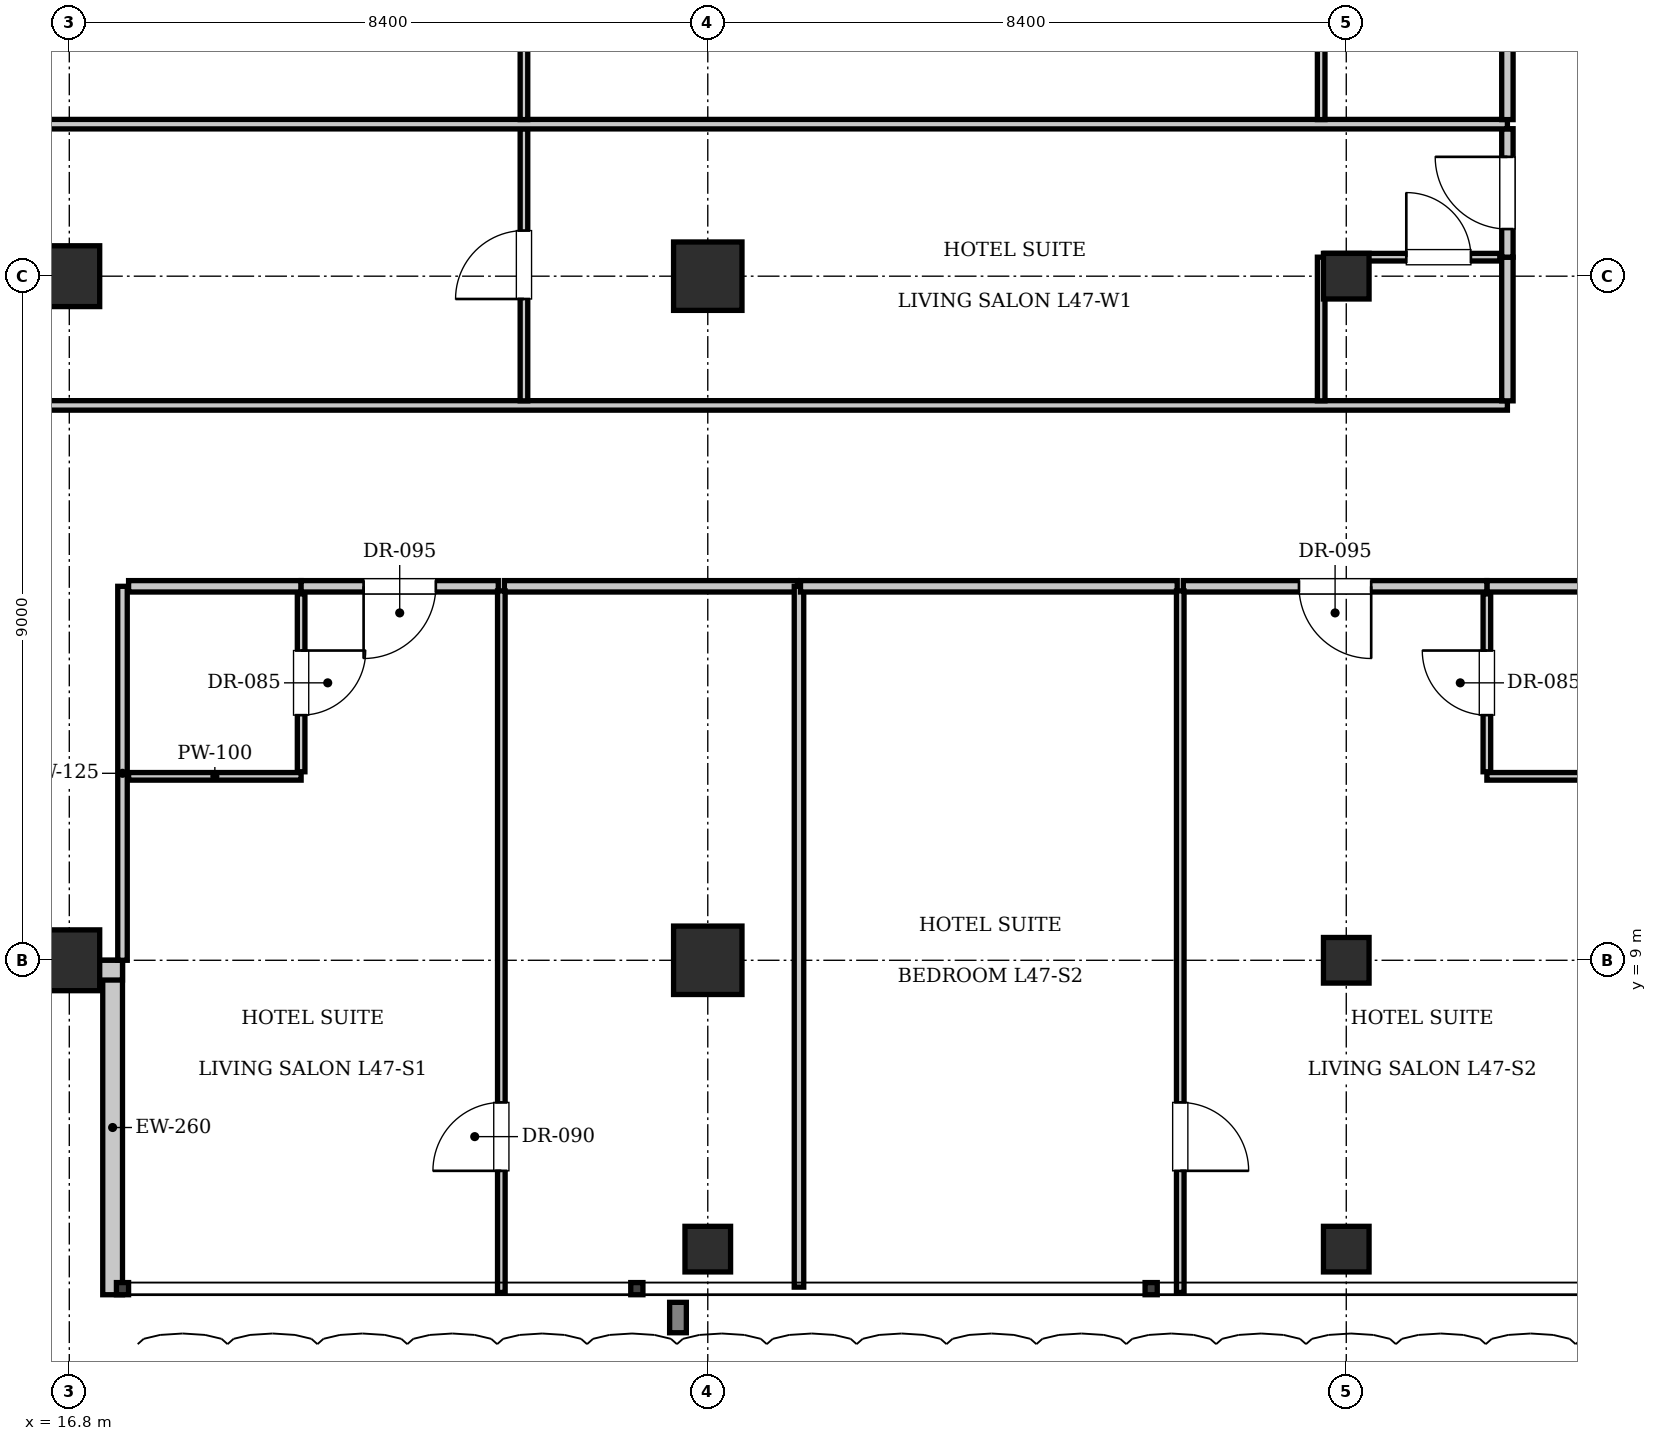
"""IFC4 building model, lengths in metres.
Left out: names, types, materials, properties, quantities, classifications, styles, units other than length and angle.
Written with IfcOpenShell. Run it as: python <this file> out.ifc"""

import sys

from ifc_helpers import new_model, si_unit, direction, frame, frame_2d, origin, origin_2d, place, context, subcontext, project, spatial, rectangle, i_section, extrude, element, fill, save


model = new_model("IFC4")
c1 = context("Model", 3, precision=1e-05, world=origin(), true_north=direction((0.0, 1.0)))
c2 = subcontext(c1, "Body", "Model", "MODEL_VIEW")
j1 = project(units=[si_unit("LENGTHUNIT", "METRE"), si_unit("PLANEANGLEUNIT", "RADIAN")], contexts=[c1])
p1 = place(None, origin())
s1 = spatial("IfcSite", under=j1, at=p1, CompositionType="ELEMENT")
p2 = place(p1, origin())
s2 = spatial("IfcBuilding", under=s1, at=p2, CompositionType="ELEMENT")
p3 = place(p2, frame((0.0, 0.0, 192.85)))
s3 = spatial("IfcBuildingStorey", under=s2, at=p3, CompositionType="ELEMENT", Elevation=192.85)
for number, where, z_axis, x_axis in (
    (1, (25.2, 18.0, 0.0), (0.0, 0.0, 1.0), (1.0, 0.0, 0.0)),
    (2, (25.2, 9.0, 0.0), (0.0, 0.0, 1.0), (1.0, 0.0, 0.0)),
):
    element("IfcColumn", number, at=place(p3, frame(where, z_axis=z_axis, x_axis=x_axis)), inside=s3, PredefinedType="COLUMN", context=c2, shape_type="SweptSolid", body=[
        extrude(rectangle(XDim=0.9, YDim=0.9, at=origin_2d()), origin(), (0.0, 0.0, 1.0), 3.85),
    ])
for number, where, z_axis, x_axis in (
    (3, (33.6, 9.0, 0.0), (0.0, 0.0, 1.0), (1.0, 0.0, 0.0)),
    (4, (33.6, 18.0, 0.0), (0.0, 0.0, 1.0), (1.0, 0.0, 0.0)),
):
    element("IfcColumn", number, at=place(p3, frame(where, z_axis=z_axis, x_axis=x_axis)), inside=s3, PredefinedType="COLUMN", context=c2, shape_type="SweptSolid", body=[
        extrude(i_section(OverallWidth=0.6, OverallDepth=0.6, WebThickness=0.025, FlangeThickness=0.038, at=origin_2d()), origin(), (0.0, 0.0, 1.0), 3.85),
    ])
for number, where, z_axis, x_axis in (
    (5, (16.8, 9.0, 0.0), (0.0, 0.0, 1.0), (1.0, 0.0, 0.0)),
    (6, (16.8, 18.0, 0.0), (0.0, 0.0, 1.0), (1.0, 0.0, 0.0)),
):
    element("IfcColumn", number, at=place(p3, frame(where, z_axis=z_axis, x_axis=x_axis)), inside=s3, PredefinedType="COLUMN", context=c2, shape_type="SweptSolid", body=[
        extrude(rectangle(XDim=0.8, YDim=0.8, at=origin_2d()), origin(), (0.0, 0.0, 1.0), 3.85),
    ])
for number, where, z_axis, x_axis in (
    (7, (25.2, 5.2, 0.0), (0.0, 0.0, 1.0), (1.0, 0.0, 0.0)),
    (8, (33.6, 5.2, 0.0), (0.0, 0.0, 1.0), (1.0, 0.0, 0.0)),
):
    element("IfcColumn", number, at=place(p3, frame(where, z_axis=z_axis, x_axis=x_axis)), inside=s3, PredefinedType="COLUMN", context=c2, shape_type="SweptSolid", body=[
        extrude(i_section(OverallWidth=0.6, OverallDepth=0.6, WebThickness=0.025, FlangeThickness=0.038, at=origin_2d()), origin(), (0.0, 0.0, 1.0), 3.85),
    ])
p4 = place(p3, frame((17.37, 4.6, 0.0), z_axis=(0.0, 0.0, 1.0), x_axis=(0.0, 1.0, 0.0)))
e9 = element("IfcWall", 9, at=p4, inside=s3, PredefinedType="SOLIDWALL", context=c2, shape_type="SweptSolid", body=[
    extrude(rectangle(XDim=4.4, YDim=0.26, at=frame_2d((2.2, 0.0))), origin(), (0.0, 0.0, 1.0), 3.61),
])
p5 = place(p3, frame((17.5, 8.87, 0.0), z_axis=(0.0, 0.0, 1.0), x_axis=(-1.0, 0.0, 0.0)))
e10 = element("IfcWall", 10, at=p5, inside=s3, PredefinedType="SOLIDWALL", context=c2, shape_type="SweptSolid", body=[
    extrude(rectangle(XDim=4.4, YDim=0.26, at=frame_2d((2.2, 0.0))), origin(), (0.0, 0.0, 1.0), 3.071),
])
p6 = place(p5, frame((1.3, 0.0, 0.9)))
e11 = element("IfcOpeningElement", 11, at=p6, cuts=e10, PredefinedType="OPENING", context=c2, shape_type="SweptSolid", body=[
    extrude(rectangle(XDim=1.8, YDim=2.1, at=frame_2d((0.9, 1.05))), frame((0.0, 0.14, 0.0), z_axis=(0.0, -1.0, 0.0), x_axis=(1.0, 0.0, 0.0)), (0.0, 0.0, 1.0), 0.28),
])
p7 = place(p3, frame((17.5, 9.0, 0.0), z_axis=(0.0, 0.0, 1.0), x_axis=(0.0, 1.0, 0.0)))
e12 = element("IfcWall", 12, at=p7, inside=s3, PredefinedType="PARTITIONING", context=c2, shape_type="SweptSolid", body=[
    extrude(rectangle(XDim=4.92, YDim=0.125, at=frame_2d((2.46, 0.0))), origin(), (0.0, 0.0, 1.0), 3.61),
])
p8 = place(p3, frame((17.58, 13.92, 0.0), z_axis=(0.0, 0.0, 1.0), x_axis=(1.0, 0.0, 0.0)))
e13 = element("IfcWall", 13, at=p8, inside=s3, PredefinedType="PARTITIONING", context=c2, shape_type="SweptSolid", body=[
    extrude(rectangle(XDim=2.27, YDim=0.15, at=frame_2d((1.135, 0.0))), origin(), (0.0, 0.0, 1.0), 3.61),
])
p9 = place(p3, frame((17.58, 11.42, 0.0), z_axis=(0.0, 0.0, 1.0), x_axis=(1.0, 0.0, 0.0)))
e14 = element("IfcWall", 14, at=p9, inside=s3, PredefinedType="PARTITIONING", context=c2, shape_type="SweptSolid", body=[
    extrude(rectangle(XDim=2.27, YDim=0.1, at=frame_2d((1.135, 0.0))), origin(), (0.0, 0.0, 1.0), 3.61),
])
p10 = place(p3, frame((19.85, 11.48, 0.0), z_axis=(0.0, 0.0, 1.0), x_axis=(0.0, 1.0, 0.0)))
e15 = element("IfcWall", 15, at=p10, inside=s3, PredefinedType="PARTITIONING", context=c2, shape_type="SweptSolid", body=[
    extrude(rectangle(XDim=2.34, YDim=0.1, at=frame_2d((1.17, 0.0))), origin(), (0.0, 0.0, 1.0), 3.61),
])
p11 = place(p10, frame((0.745, 0.0, 0.0)))
e16 = element("IfcOpeningElement", 16, at=p11, cuts=e15, PredefinedType="OPENING", context=c2, shape_type="SweptSolid", body=[
    extrude(rectangle(XDim=0.85, YDim=2.1, at=frame_2d((0.425, 1.05))), frame((0.0, 0.06, 0.0), z_axis=(0.0, -1.0, 0.0), x_axis=(1.0, 0.0, 0.0)), (0.0, 0.0, 1.0), 0.12),
])
p12 = place(p3, frame((19.85, 13.92, 0.0), z_axis=(0.0, 0.0, 1.0), x_axis=(1.0, 0.0, 0.0)))
e17 = element("IfcWall", 17, at=p12, inside=s3, PredefinedType="PARTITIONING", context=c2, shape_type="SweptSolid", body=[
    extrude(rectangle(XDim=2.594, YDim=0.15, at=frame_2d((1.297, 0.0))), origin(), (0.0, 0.0, 1.0), 3.61),
])
p13 = place(p12, frame((0.822, 0.0, 0.0)))
e18 = element("IfcOpeningElement", 18, at=p13, cuts=e17, PredefinedType="OPENING", context=c2, shape_type="SweptSolid", body=[
    extrude(rectangle(XDim=0.95, YDim=2.15, at=frame_2d((0.475, 1.075))), frame((0.0, 0.085, 0.0), z_axis=(0.0, -1.0, 0.0), x_axis=(1.0, 0.0, 0.0)), (0.0, 0.0, 1.0), 0.17),
])
p14 = place(p3, frame((22.524, 13.92, 0.0), z_axis=(0.0, 0.0, 1.0), x_axis=(1.0, 0.0, 0.0)))
e19 = element("IfcWall", 19, at=p14, inside=s3, PredefinedType="PARTITIONING", context=c2, shape_type="SweptSolid", body=[
    extrude(rectangle(XDim=3.856, YDim=0.15, at=frame_2d((1.928, 0.0))), origin(), (0.0, 0.0, 1.0), 3.61),
])
p15 = place(p3, frame((22.484, 4.63, 0.0), z_axis=(0.0, 0.0, 1.0), x_axis=(0.0, 1.0, 0.0)))
e20 = element("IfcWall", 20, at=p15, inside=s3, PredefinedType="PARTITIONING", context=c2, shape_type="SweptSolid", body=[
    extrude(rectangle(XDim=9.23, YDim=0.1, at=frame_2d((4.615, 0.0))), origin(), (0.0, 0.0, 1.0), 3.61),
])
p16 = place(p15, frame((1.6, 0.0, 0.0)))
e21 = element("IfcOpeningElement", 21, at=p16, cuts=e20, PredefinedType="OPENING", context=c2, shape_type="SweptSolid", body=[
    extrude(rectangle(XDim=0.9, YDim=2.1, at=frame_2d((0.45, 1.05))), frame((0.0, 0.06, 0.0), z_axis=(0.0, -1.0, 0.0), x_axis=(1.0, 0.0, 0.0)), (0.0, 0.0, 1.0), 0.12),
])
p17 = place(p3, frame((26.4, 4.7, 0.0), z_axis=(0.0, 0.0, 1.0), x_axis=(0.0, 1.0, 0.0)))
e22 = element("IfcWall", 22, at=p17, inside=s3, PredefinedType="PARTITIONING", context=c2, shape_type="SweptSolid", body=[
    extrude(rectangle(XDim=9.22, YDim=0.125, at=frame_2d((4.61, 0.0))), origin(), (0.0, 0.0, 1.0), 3.61),
])
p18 = place(p3, frame((35.45, 13.92, 0.0), z_axis=(0.0, 0.0, 1.0), x_axis=(1.0, 0.0, 0.0)))
e23 = element("IfcWall", 23, at=p18, inside=s3, PredefinedType="PARTITIONING", context=c2, shape_type="SweptSolid", body=[
    extrude(rectangle(XDim=2.33, YDim=0.15, at=frame_2d((1.165, 0.0))), origin(), (0.0, 0.0, 1.0), 3.61),
])
p19 = place(p3, frame((35.45, 11.42, 0.0), z_axis=(0.0, 0.0, 1.0), x_axis=(1.0, 0.0, 0.0)))
e24 = element("IfcWall", 24, at=p19, inside=s3, PredefinedType="PARTITIONING", context=c2, shape_type="SweptSolid", body=[
    extrude(rectangle(XDim=2.31, YDim=0.1, at=frame_2d((1.155, 0.0))), origin(), (0.0, 0.0, 1.0), 3.61),
])
p20 = place(p3, frame((35.45, 11.48, 0.0), z_axis=(0.0, 0.0, 1.0), x_axis=(0.0, 1.0, 0.0)))
e25 = element("IfcWall", 25, at=p20, inside=s3, PredefinedType="PARTITIONING", context=c2, shape_type="SweptSolid", body=[
    extrude(rectangle(XDim=2.34, YDim=0.1, at=frame_2d((1.17, 0.0))), origin(), (0.0, 0.0, 1.0), 3.61),
])
p21 = place(p20, frame((0.745, 0.0, 0.0)))
e26 = element("IfcOpeningElement", 26, at=p21, cuts=e25, PredefinedType="OPENING", context=c2, shape_type="SweptSolid", body=[
    extrude(rectangle(XDim=0.85, YDim=2.1, at=frame_2d((0.425, 1.05))), frame((0.0, 0.06, 0.0), z_axis=(0.0, -1.0, 0.0), x_axis=(1.0, 0.0, 0.0)), (0.0, 0.0, 1.0), 0.12),
])
p22 = place(p3, frame((26.42, 13.92, 0.0), z_axis=(0.0, 0.0, 1.0), x_axis=(1.0, 0.0, 0.0)))
e27 = element("IfcWall", 27, at=p22, inside=s3, PredefinedType="PARTITIONING", context=c2, shape_type="SweptSolid", body=[
    extrude(rectangle(XDim=4.956, YDim=0.15, at=frame_2d((2.478, 0.0))), origin(), (0.0, 0.0, 1.0), 3.61),
])
p23 = place(p3, frame((31.456, 13.92, 0.0), z_axis=(0.0, 0.0, 1.0), x_axis=(1.0, 0.0, 0.0)))
e28 = element("IfcWall", 28, at=p23, inside=s3, PredefinedType="PARTITIONING", context=c2, shape_type="SweptSolid", body=[
    extrude(rectangle(XDim=3.994, YDim=0.15, at=frame_2d((1.997, 0.0))), origin(), (0.0, 0.0, 1.0), 3.61),
])
p24 = place(p23, frame((1.522, 0.0, 0.0)))
e29 = element("IfcOpeningElement", 29, at=p24, cuts=e28, PredefinedType="OPENING", context=c2, shape_type="SweptSolid", body=[
    extrude(rectangle(XDim=0.95, YDim=2.15, at=frame_2d((0.475, 1.075))), frame((0.0, 0.085, 0.0), z_axis=(0.0, -1.0, 0.0), x_axis=(1.0, 0.0, 0.0)), (0.0, 0.0, 1.0), 0.17),
])
p25 = place(p3, frame((31.416, 4.63, 0.0), z_axis=(0.0, 0.0, 1.0), x_axis=(0.0, 1.0, 0.0)))
e30 = element("IfcWall", 30, at=p25, inside=s3, PredefinedType="PARTITIONING", context=c2, shape_type="SweptSolid", body=[
    extrude(rectangle(XDim=9.23, YDim=0.1, at=frame_2d((4.615, 0.0))), origin(), (0.0, 0.0, 1.0), 3.61),
])
p26 = place(p25, frame((1.6, 0.0, 0.0)))
e31 = element("IfcOpeningElement", 31, at=p26, cuts=e30, PredefinedType="OPENING", context=c2, shape_type="SweptSolid", body=[
    extrude(rectangle(XDim=0.9, YDim=2.1, at=frame_2d((0.45, 1.05))), frame((0.0, 0.06, 0.0), z_axis=(0.0, -1.0, 0.0), x_axis=(1.0, 0.0, 0.0)), (0.0, 0.0, 1.0), 0.12),
])
p27 = place(p3, frame((13.2, 16.3, 0.0), z_axis=(0.0, 0.0, 1.0), x_axis=(1.0, 0.0, 0.0)))
e32 = element("IfcWall", 32, at=p27, inside=s3, PredefinedType="PARTITIONING", context=c2, shape_type="SweptSolid", body=[
    extrude(rectangle(XDim=22.52, YDim=0.125, at=frame_2d((11.26, 0.0))), origin(), (0.0, 0.0, 1.0), 3.61),
])
p28 = place(p3, frame((35.72, 16.36, 0.0), z_axis=(0.0, 0.0, 1.0), x_axis=(0.0, 1.0, 0.0)))
e33 = element("IfcWall", 33, at=p28, inside=s3, PredefinedType="PARTITIONING", context=c2, shape_type="SweptSolid", body=[
    extrude(rectangle(XDim=1.89, YDim=0.15, at=frame_2d((0.945, 0.0))), origin(), (0.0, 0.0, 1.0), 3.61),
])
p29 = place(p3, frame((35.72, 18.25, 0.0), z_axis=(0.0, 0.0, 1.0), x_axis=(0.0, 1.0, 0.0)))
e34 = element("IfcWall", 34, at=p29, inside=s3, PredefinedType="PARTITIONING", context=c2, shape_type="SweptSolid", body=[
    extrude(rectangle(XDim=1.69, YDim=0.15, at=frame_2d((0.845, 0.0))), origin(), (0.0, 0.0, 1.0), 3.61),
])
p30 = place(p29, frame((0.37, 0.0, 0.0)))
e35 = element("IfcOpeningElement", 35, at=p30, cuts=e34, PredefinedType="OPENING", context=c2, shape_type="SweptSolid", body=[
    extrude(rectangle(XDim=0.95, YDim=2.15, at=frame_2d((0.475, 1.075))), frame((0.0, 0.085, 0.0), z_axis=(0.0, -1.0, 0.0), x_axis=(1.0, 0.0, 0.0)), (0.0, 0.0, 1.0), 0.17),
])
p31 = place(p3, frame((33.27, 16.36, 0.0), z_axis=(0.0, 0.0, 1.0), x_axis=(0.0, 1.0, 0.0)))
e36 = element("IfcWall", 36, at=p31, inside=s3, PredefinedType="PARTITIONING", context=c2, shape_type="SweptSolid", body=[
    extrude(rectangle(XDim=1.89, YDim=0.1, at=frame_2d((0.945, 0.0))), origin(), (0.0, 0.0, 1.0), 3.61),
])
p32 = place(p3, frame((33.32, 18.25, 0.0), z_axis=(0.0, 0.0, 1.0), x_axis=(1.0, 0.0, 0.0)))
e37 = element("IfcWall", 37, at=p32, inside=s3, PredefinedType="PARTITIONING", context=c2, shape_type="SweptSolid", body=[
    extrude(rectangle(XDim=2.3, YDim=0.1, at=frame_2d((1.15, 0.0))), origin(), (0.0, 0.0, 1.0), 3.61),
])
p33 = place(p32, frame((1.07, 0.0, 0.0)))
e38 = element("IfcOpeningElement", 38, at=p33, cuts=e37, PredefinedType="OPENING", context=c2, shape_type="SweptSolid", body=[
    extrude(rectangle(XDim=0.85, YDim=2.1, at=frame_2d((0.425, 1.05))), frame((0.0, 0.06, 0.0), z_axis=(0.0, -1.0, 0.0), x_axis=(1.0, 0.0, 0.0)), (0.0, 0.0, 1.0), 0.12),
])
p34 = place(p3, frame((22.781, 16.36, 0.0), z_axis=(0.0, 0.0, 1.0), x_axis=(0.0, 1.0, 0.0)))
e39 = element("IfcWall", 39, at=p34, inside=s3, PredefinedType="PARTITIONING", context=c2, shape_type="SweptSolid", body=[
    extrude(rectangle(XDim=3.58, YDim=0.1, at=frame_2d((1.79, 0.0))), origin(), (0.0, 0.0, 1.0), 3.61),
])
p35 = place(p34, frame((1.34, 0.0, 0.0)))
e40 = element("IfcOpeningElement", 40, at=p35, cuts=e39, PredefinedType="OPENING", context=c2, shape_type="SweptSolid", body=[
    extrude(rectangle(XDim=0.9, YDim=2.1, at=frame_2d((0.45, 1.05))), frame((0.0, 0.06, 0.0), z_axis=(0.0, -1.0, 0.0), x_axis=(1.0, 0.0, 0.0)), (0.0, 0.0, 1.0), 0.12),
])
p36 = place(p3, frame((13.2, 20.0, 0.0), z_axis=(0.0, 0.0, 1.0), x_axis=(1.0, 0.0, 0.0)))
e41 = element("IfcWall", 41, at=p36, inside=s3, PredefinedType="PARTITIONING", context=c2, shape_type="SweptSolid", body=[
    extrude(rectangle(XDim=22.52, YDim=0.125, at=frame_2d((11.26, 0.0))), origin(), (0.0, 0.0, 1.0), 3.61),
])
p37 = place(p3, frame((35.72, 20.06, 0.0), z_axis=(0.0, 0.0, 1.0), x_axis=(0.0, 1.0, 0.0)))
e42 = element("IfcWall", 42, at=p37, inside=s3, PredefinedType="PARTITIONING", context=c2, shape_type="SweptSolid", body=[
    extrude(rectangle(XDim=1.89, YDim=0.15, at=frame_2d((0.945, 0.0))), origin(), (0.0, 0.0, 1.0), 3.61),
])
p38 = place(p3, frame((33.27, 20.06, 0.0), z_axis=(0.0, 0.0, 1.0), x_axis=(0.0, 1.0, 0.0)))
e43 = element("IfcWall", 43, at=p38, inside=s3, PredefinedType="PARTITIONING", context=c2, shape_type="SweptSolid", body=[
    extrude(rectangle(XDim=1.89, YDim=0.1, at=frame_2d((0.945, 0.0))), origin(), (0.0, 0.0, 1.0), 3.61),
])
p39 = place(p3, frame((22.781, 20.06, 0.0), z_axis=(0.0, 0.0, 1.0), x_axis=(0.0, 1.0, 0.0)))
e44 = element("IfcWall", 44, at=p39, inside=s3, PredefinedType="PARTITIONING", context=c2, shape_type="SweptSolid", body=[
    extrude(rectangle(XDim=3.58, YDim=0.1, at=frame_2d((1.79, 0.0))), origin(), (0.0, 0.0, 1.0), 3.61),
])
p40 = place(p39, frame((1.34, 0.0, 0.0)))
e45 = element("IfcOpeningElement", 45, at=p40, cuts=e44, PredefinedType="OPENING", context=c2, shape_type="SweptSolid", body=[
    extrude(rectangle(XDim=0.9, YDim=2.1, at=frame_2d((0.45, 1.05))), frame((0.0, 0.06, 0.0), z_axis=(0.0, -1.0, 0.0), x_axis=(1.0, 0.0, 0.0)), (0.0, 0.0, 1.0), 0.12),
])
p41 = place(p11, frame((0.85, 0.0, 0.0), z_axis=(0.0, 0.0, 1.0), x_axis=(-1.0, 0.0, 0.0)))
e46 = element("IfcDoor", 46, at=p41, inside=s3, OperationType="SINGLE_SWING_LEFT", PredefinedType="DOOR", context=c2, shape_type="SweptSolid", body=[
    extrude(rectangle(XDim=0.85, YDim=2.1, at=frame_2d((0.425, 1.05))), frame((0.0, 0.025, 0.0), z_axis=(0.0, -1.0, 0.0), x_axis=(1.0, 0.0, 0.0)), (0.0, 0.0, 1.0), 0.05),
])
fill(e16, e46)
p42 = place(p13, frame((0.95, 0.0, 0.0), z_axis=(0.0, 0.0, 1.0), x_axis=(-1.0, 0.0, 0.0)))
e47 = element("IfcDoor", 47, at=p42, inside=s3, OperationType="SINGLE_SWING_RIGHT", PredefinedType="DOOR", context=c2, shape_type="SweptSolid", body=[
    extrude(rectangle(XDim=0.95, YDim=2.15, at=frame_2d((0.475, 1.075))), frame((0.0, 0.025, 0.0), z_axis=(0.0, -1.0, 0.0), x_axis=(1.0, 0.0, 0.0)), (0.0, 0.0, 1.0), 0.05),
])
fill(e18, e47)
p43 = place(p16, origin())
e48 = element("IfcDoor", 48, at=p43, inside=s3, OperationType="SINGLE_SWING_LEFT", PredefinedType="DOOR", context=c2, shape_type="SweptSolid", body=[
    extrude(rectangle(XDim=0.9, YDim=2.1, at=frame_2d((0.45, 1.05))), frame((0.0, 0.025, 0.0), z_axis=(0.0, -1.0, 0.0), x_axis=(1.0, 0.0, 0.0)), (0.0, 0.0, 1.0), 0.05),
])
fill(e21, e48)
p44 = place(p21, origin())
e49 = element("IfcDoor", 49, at=p44, inside=s3, OperationType="SINGLE_SWING_RIGHT", PredefinedType="DOOR", context=c2, shape_type="SweptSolid", body=[
    extrude(rectangle(XDim=0.85, YDim=2.1, at=frame_2d((0.425, 1.05))), frame((0.0, 0.025, 0.0), z_axis=(0.0, -1.0, 0.0), x_axis=(1.0, 0.0, 0.0)), (0.0, 0.0, 1.0), 0.05),
])
fill(e26, e49)
p45 = place(p24, frame((0.95, 0.0, 0.0), z_axis=(0.0, 0.0, 1.0), x_axis=(-1.0, 0.0, 0.0)))
e50 = element("IfcDoor", 50, at=p45, inside=s3, OperationType="SINGLE_SWING_LEFT", PredefinedType="DOOR", context=c2, shape_type="SweptSolid", body=[
    extrude(rectangle(XDim=0.95, YDim=2.15, at=frame_2d((0.475, 1.075))), frame((0.0, 0.025, 0.0), z_axis=(0.0, -1.0, 0.0), x_axis=(1.0, 0.0, 0.0)), (0.0, 0.0, 1.0), 0.05),
])
fill(e29, e50)
p46 = place(p26, frame((0.9, 0.0, 0.0), z_axis=(0.0, 0.0, 1.0), x_axis=(-1.0, 0.0, 0.0)))
e51 = element("IfcDoor", 51, at=p46, inside=s3, OperationType="SINGLE_SWING_RIGHT", PredefinedType="DOOR", context=c2, shape_type="SweptSolid", body=[
    extrude(rectangle(XDim=0.9, YDim=2.1, at=frame_2d((0.45, 1.05))), frame((0.0, 0.025, 0.0), z_axis=(0.0, -1.0, 0.0), x_axis=(1.0, 0.0, 0.0)), (0.0, 0.0, 1.0), 0.05),
])
fill(e31, e51)
p47 = place(p33, origin())
e52 = element("IfcDoor", 52, at=p47, inside=s3, OperationType="SINGLE_SWING_LEFT", PredefinedType="DOOR", context=c2, shape_type="SweptSolid", body=[
    extrude(rectangle(XDim=0.85, YDim=2.1, at=frame_2d((0.425, 1.05))), frame((0.0, 0.025, 0.0), z_axis=(0.0, -1.0, 0.0), x_axis=(1.0, 0.0, 0.0)), (0.0, 0.0, 1.0), 0.05),
])
fill(e38, e52)
p48 = place(p30, origin())
e53 = element("IfcDoor", 53, at=p48, inside=s3, OperationType="SINGLE_SWING_RIGHT", PredefinedType="DOOR", context=c2, shape_type="SweptSolid", body=[
    extrude(rectangle(XDim=0.95, YDim=2.15, at=frame_2d((0.475, 1.075))), frame((0.0, 0.025, 0.0), z_axis=(0.0, -1.0, 0.0), x_axis=(1.0, 0.0, 0.0)), (0.0, 0.0, 1.0), 0.05),
])
fill(e35, e53)
p49 = place(p35, origin())
e54 = element("IfcDoor", 54, at=p49, inside=s3, OperationType="SINGLE_SWING_LEFT", PredefinedType="DOOR", context=c2, shape_type="SweptSolid", body=[
    extrude(rectangle(XDim=0.9, YDim=2.1, at=frame_2d((0.45, 1.05))), frame((0.0, 0.025, 0.0), z_axis=(0.0, -1.0, 0.0), x_axis=(1.0, 0.0, 0.0)), (0.0, 0.0, 1.0), 0.05),
])
fill(e40, e54)
save(model, sys.argv[1])
